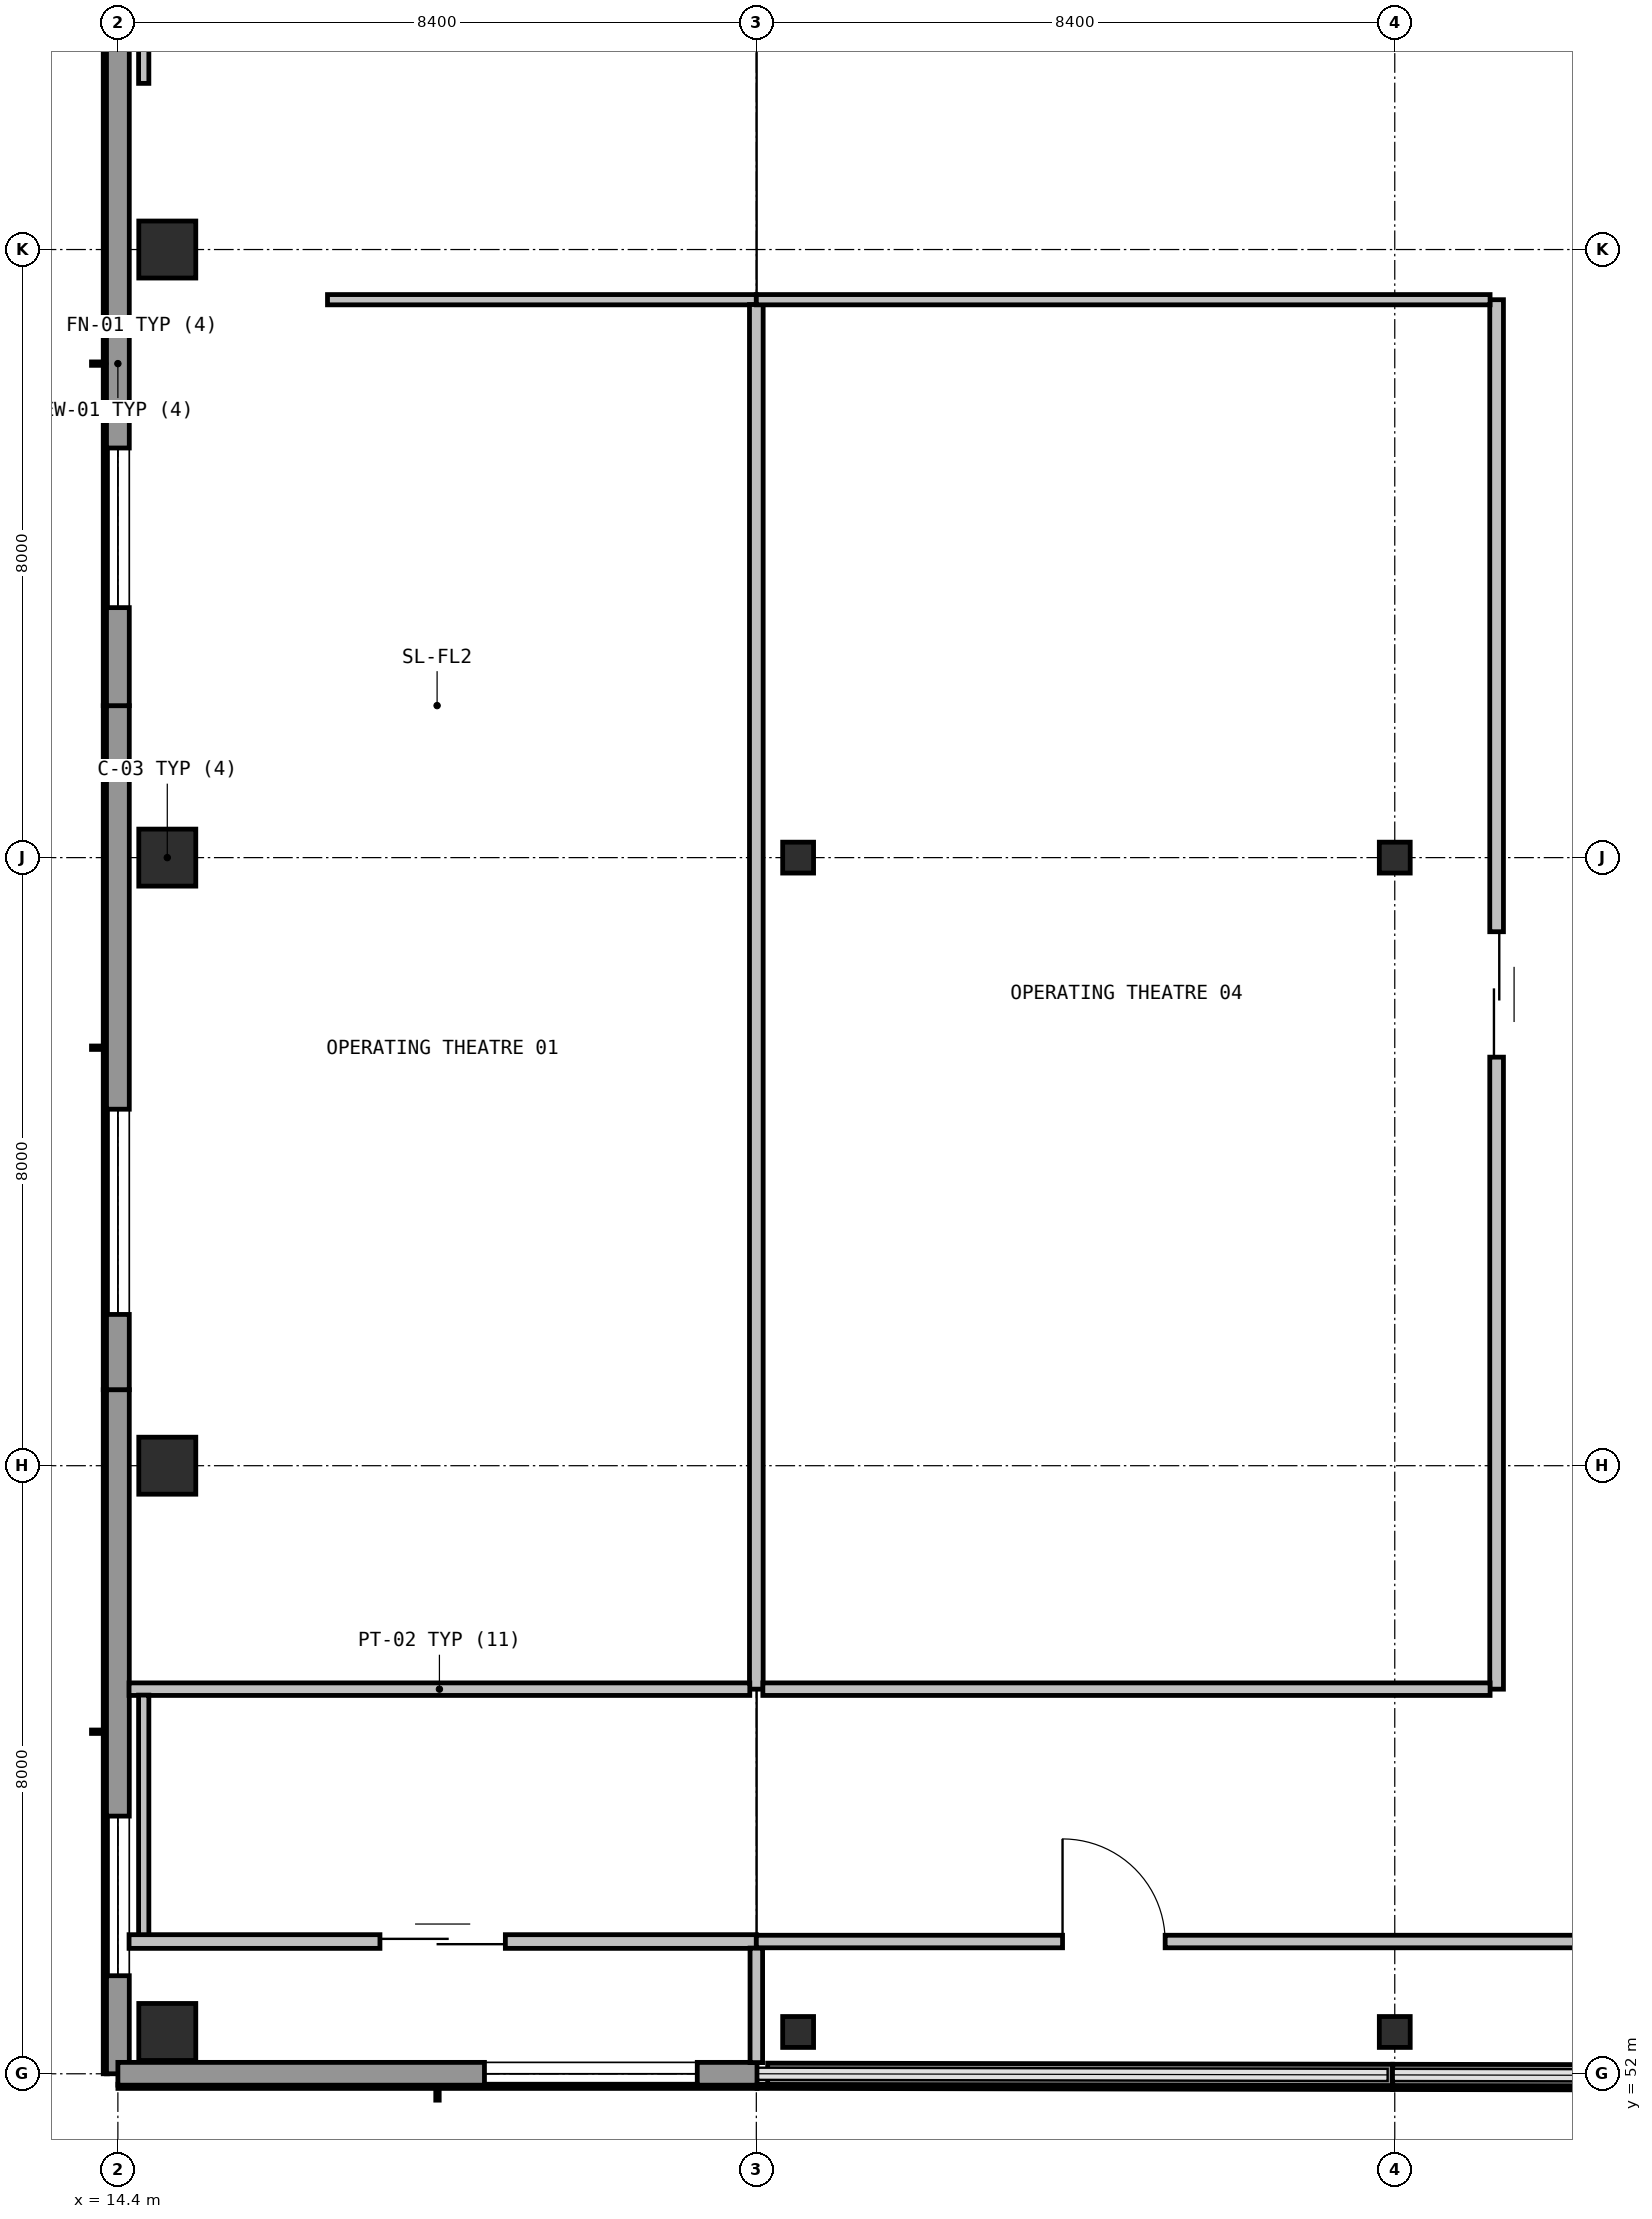
"""IFC4 building model, lengths in metres.
Left out: names, types, materials, properties, quantities, classifications, styles, units other than length and angle.
Written with IfcOpenShell. Run it as: python <this file> out.ifc"""

import sys

from ifc_helpers import new_model, si_unit, direction, frame, frame_2d, origin, origin_2d, place, context, subcontext, project, spatial, rectangle, hollow_circle, extrude, element, fill, save


model = new_model("IFC4")
c1 = context("Model", 3, precision=1e-05, world=origin(), true_north=direction((0.0, 1.0)))
c2 = subcontext(c1, "Body", "Model", "MODEL_VIEW")
j1 = project(units=[si_unit("LENGTHUNIT", "METRE"), si_unit("PLANEANGLEUNIT", "RADIAN")], contexts=[c1])
p1 = place(None, origin())
s1 = spatial("IfcSite", under=j1, at=p1, CompositionType="ELEMENT")
p2 = place(p1, origin())
s2 = spatial("IfcBuilding", under=s1, at=p2, CompositionType="ELEMENT")
p3 = place(p2, frame((0.0, 0.0, 10.2)))
s3 = spatial("IfcBuildingStorey", under=s2, at=p3, CompositionType="ELEMENT", Elevation=10.2)
p4 = place(p3, frame((23.35, 52.55, 0.0), z_axis=(0.0, 0.0, 1.0), x_axis=(1.0, 0.0, 0.0)))
e1 = element("IfcColumn", 1, at=p4, inside=s3, PredefinedType="COLUMN", context=c2, shape_type="SweptSolid", body=[
    extrude(hollow_circle(Radius=0.203, WallThickness=0.016, at=origin_2d()), origin(), (0.0, 0.0, 1.0), 4.555),
])
p5 = place(p3, frame((23.35, 68.0, 0.0), z_axis=(0.0, 0.0, 1.0), x_axis=(1.0, 0.0, 0.0)))
e2 = element("IfcColumn", 2, at=p5, inside=s3, PredefinedType="COLUMN", context=c2, shape_type="SweptSolid", body=[
    extrude(hollow_circle(Radius=0.203, WallThickness=0.016, at=origin_2d()), origin(), (0.0, 0.0, 1.0), 4.8),
])
p6 = place(p3, frame((31.2, 52.55, 0.0), z_axis=(0.0, 0.0, 1.0), x_axis=(1.0, 0.0, 0.0)))
e3 = element("IfcColumn", 3, at=p6, inside=s3, PredefinedType="COLUMN", context=c2, shape_type="SweptSolid", body=[
    extrude(hollow_circle(Radius=0.203, WallThickness=0.016, at=origin_2d()), origin(), (0.0, 0.0, 1.0), 4.555),
])
p7 = place(p3, frame((31.2, 68.0, 0.0), z_axis=(0.0, 0.0, 1.0), x_axis=(1.0, 0.0, 0.0)))
e4 = element("IfcColumn", 4, at=p7, inside=s3, PredefinedType="COLUMN", context=c2, shape_type="SweptSolid", body=[
    extrude(hollow_circle(Radius=0.203, WallThickness=0.016, at=origin_2d()), origin(), (0.0, 0.0, 1.0), 4.8),
])
for number, where, z_axis, x_axis in (
    (5, (15.05, 52.55, 0.0), (0.0, 0.0, 1.0), (1.0, 0.0, 0.0)),
    (6, (15.05, 60.0, 0.0), (0.0, 0.0, 1.0), (1.0, 0.0, 0.0)),
    (7, (15.05, 68.0, 0.0), (0.0, 0.0, 1.0), (1.0, 0.0, 0.0)),
    (8, (15.05, 76.0, 0.0), (0.0, 0.0, 1.0), (1.0, 0.0, 0.0)),
):
    element("IfcColumn", number, at=place(p3, frame(where, z_axis=z_axis, x_axis=x_axis)), inside=s3, PredefinedType="COLUMN", context=c2, shape_type="SweptSolid", body=[
        extrude(rectangle(XDim=0.75, YDim=0.75, at=origin_2d()), origin(), (0.0, 0.0, 1.0), 4.54),
    ])
p8 = place(p3, frame((14.4, 52.0, 0.0), z_axis=(0.0, 0.0, 1.0), x_axis=(0.0, 1.0, 0.0)))
e9 = element("IfcWall", 9, at=p8, inside=s3, PredefinedType="SOLIDWALL", context=c2, shape_type="SweptSolid", body=[
    extrude(rectangle(XDim=9.0, YDim=0.3, at=frame_2d((4.5, 0.0))), origin(), (0.0, 0.0, 1.0), 4.46),
])
p9 = place(p8, frame((1.29, 0.0, 0.96)))
e10 = element("IfcOpeningElement", 10, at=p9, cuts=e9, PredefinedType="OPENING", context=c2, shape_type="SweptSolid", body=[
    extrude(rectangle(XDim=2.1, YDim=1.5, at=frame_2d((1.05, 0.75))), frame((0.0, 0.16, 0.0), z_axis=(0.0, -1.0, 0.0), x_axis=(1.0, 0.0, 0.0)), (0.0, 0.0, 1.0), 0.32),
])
p10 = place(p3, frame((14.4, 61.0, 0.0), z_axis=(0.0, 0.0, 1.0), x_axis=(0.0, 1.0, 0.0)))
e11 = element("IfcWall", 11, at=p10, inside=s3, PredefinedType="SOLIDWALL", context=c2, shape_type="SweptSolid", body=[
    extrude(rectangle(XDim=8.999, YDim=0.3, at=frame_2d((4.5, 0.0))), origin(), (0.0, 0.0, 1.0), 4.46),
])
p11 = place(p10, frame((0.99, 0.0, 0.96)))
e12 = element("IfcOpeningElement", 12, at=p11, cuts=e11, PredefinedType="OPENING", context=c2, shape_type="SweptSolid", body=[
    extrude(rectangle(XDim=2.7, YDim=1.5, at=frame_2d((1.35, 0.75))), frame((0.0, 0.16, 0.0), z_axis=(0.0, -1.0, 0.0), x_axis=(1.0, 0.0, 0.0)), (0.0, 0.0, 1.0), 0.32),
])
p12 = place(p3, frame((14.4, 69.999, 0.0), z_axis=(0.0, 0.0, 1.0), x_axis=(0.0, 1.0, 0.0)))
e13 = element("IfcWall", 13, at=p12, inside=s3, PredefinedType="SOLIDWALL", context=c2, shape_type="SweptSolid", body=[
    extrude(rectangle(XDim=9.0, YDim=0.3, at=frame_2d((4.5, 0.0))), origin(), (0.0, 0.0, 1.0), 4.46),
])
p13 = place(p12, frame((1.29, 0.0, 0.96)))
e14 = element("IfcOpeningElement", 14, at=p13, cuts=e13, PredefinedType="OPENING", context=c2, shape_type="SweptSolid", body=[
    extrude(rectangle(XDim=2.1, YDim=1.65, at=frame_2d((1.05, 0.825))), frame((0.0, 0.16, 0.0), z_axis=(0.0, -1.0, 0.0), x_axis=(1.0, 0.0, 0.0)), (0.0, 0.0, 1.0), 0.32),
])
p14 = place(p3, frame((39.531, 51.97, 0.0), z_axis=(0.0, 0.0, 1.0), x_axis=(-0.999998360026, 0.001811062053, 0.0)))
e15 = element("IfcWall", 15, at=p14, inside=s3, PredefinedType="SOLIDWALL", context=c2, shape_type="SweptSolid", body=[
    extrude(rectangle(XDim=8.358, YDim=0.28, at=frame_2d((4.179, 0.0))), origin(), (0.0, 0.0, 1.0), 0.94),
])
p15 = place(p3, frame((31.169, 51.985, 0.0), z_axis=(0.0, 0.0, 1.0), x_axis=(-0.999998358775, 0.001811752647, 0.0)))
e16 = element("IfcWall", 16, at=p15, inside=s3, PredefinedType="SOLIDWALL", context=c2, shape_type="SweptSolid", body=[
    extrude(rectangle(XDim=8.22, YDim=0.28, at=frame_2d((4.11, 0.0))), origin(), (0.0, 0.0, 1.0), 0.94),
])
p16 = place(p3, frame((22.809, 52.0, 0.0), z_axis=(0.0, 0.0, 1.0), x_axis=(-1.0, 0.0, 0.0)))
e17 = element("IfcWall", 17, at=p16, inside=s3, PredefinedType="SOLIDWALL", context=c2, shape_type="SweptSolid", body=[
    extrude(rectangle(XDim=8.409, YDim=0.3, at=frame_2d((4.205, 0.0))), origin(), (0.0, 0.0, 1.0), 4.46),
])
p17 = place(p16, frame((0.786, 0.0, 0.96)))
e18 = element("IfcOpeningElement", 18, at=p17, cuts=e17, PredefinedType="OPENING", context=c2, shape_type="SweptSolid", body=[
    extrude(rectangle(XDim=2.8, YDim=1.65, at=frame_2d((1.4, 0.825))), frame((0.0, 0.16, 0.0), z_axis=(0.0, -1.0, 0.0), x_axis=(1.0, 0.0, 0.0)), (0.0, 0.0, 1.0), 0.32),
])
p18 = place(p3, frame((17.158, 75.34, 0.0), z_axis=(0.0, 0.0, 1.0), x_axis=(1.0, 0.0, 0.0)))
e19 = element("IfcWall", 19, at=p18, inside=s3, PredefinedType="PARTITIONING", context=c2, shape_type="SweptSolid", body=[
    extrude(rectangle(XDim=5.642, YDim=0.135, at=frame_2d((2.821, 0.0))), origin(), (0.0, 0.0, 1.0), 4.46),
])
p19 = place(p3, frame((22.8, 75.276, 0.0), z_axis=(0.0, 0.0, 1.0), x_axis=(0.0, -1.0, 0.0)))
e20 = element("IfcWall", 20, at=p19, inside=s3, PredefinedType="PARTITIONING", context=c2, shape_type="SweptSolid", body=[
    extrude(rectangle(XDim=18.216, YDim=0.18, at=frame_2d((9.108, 0.0))), origin(), (0.0, 0.0, 1.0), 4.46),
])
p20 = place(p3, frame((22.714, 57.06, 0.0), z_axis=(0.0, 0.0, 1.0), x_axis=(-1.0, 0.0, 0.0)))
e21 = element("IfcWall", 21, at=p20, inside=s3, PredefinedType="PARTITIONING", context=c2, shape_type="SweptSolid", body=[
    extrude(rectangle(XDim=8.167, YDim=0.165, at=frame_2d((4.083, 0.0))), origin(), (0.0, 0.0, 1.0), 4.46),
])
p21 = place(p3, frame((14.74, 56.982, 0.0), z_axis=(0.0, 0.0, 1.0), x_axis=(0.0, -1.0, 0.0)))
e22 = element("IfcWall", 22, at=p21, inside=s3, PredefinedType="PARTITIONING", context=c2, shape_type="SweptSolid", body=[
    extrude(rectangle(XDim=3.182, YDim=0.135, at=frame_2d((1.591, 0.0))), origin(), (0.0, 0.0, 1.0), 4.46),
])
p22 = place(p3, frame((14.547, 53.74, 0.0), z_axis=(0.0, 0.0, 1.0), x_axis=(1.0, 0.0, 0.0)))
e23 = element("IfcWall", 23, at=p22, inside=s3, PredefinedType="PARTITIONING", context=c2, shape_type="SweptSolid", body=[
    extrude(rectangle(XDim=8.253, YDim=0.18, at=frame_2d((4.126, 0.0))), origin(), (0.0, 0.0, 1.0), 4.46),
])
p23 = place(p22, frame((3.301, 0.0, 0.0)))
e24 = element("IfcOpeningElement", 24, at=p23, cuts=e23, PredefinedType="OPENING", context=c2, shape_type="SweptSolid", body=[
    extrude(rectangle(XDim=1.65, YDim=2.2, at=frame_2d((0.825, 1.1))), frame((0.0, 0.1, 0.0), z_axis=(0.0, -1.0, 0.0), x_axis=(1.0, 0.0, 0.0)), (0.0, 0.0, 1.0), 0.2),
])
p24 = place(p3, frame((22.8, 53.654, 0.0), z_axis=(0.0, 0.0, 1.0), x_axis=(0.0, -1.0, 0.0)))
e25 = element("IfcWall", 25, at=p24, inside=s3, PredefinedType="PARTITIONING", context=c2, shape_type="SweptSolid", body=[
    extrude(rectangle(XDim=1.507, YDim=0.165, at=frame_2d((0.753, 0.0))), origin(), (0.0, 0.0, 1.0), 4.46),
])
p25 = place(p3, frame((22.8, 53.74, 0.0), z_axis=(0.0, 0.0, 1.0), x_axis=(1.0, 0.0, 0.0)))
e26 = element("IfcWall", 26, at=p25, inside=s3, PredefinedType="PARTITIONING", context=c2, shape_type="SweptSolid", body=[
    extrude(rectangle(XDim=16.8, YDim=0.165, at=frame_2d((8.4, 0.0))), origin(), (0.0, 0.0, 1.0), 4.46),
])
p26 = place(p25, frame((4.029, 0.0, 0.0)))
e27 = element("IfcOpeningElement", 27, at=p26, cuts=e26, PredefinedType="OPENING", context=c2, shape_type="SweptSolid", body=[
    extrude(rectangle(XDim=1.35, YDim=2.15, at=frame_2d((0.675, 1.075))), frame((0.0, 0.093, 0.0), z_axis=(0.0, -1.0, 0.0), x_axis=(1.0, 0.0, 0.0)), (0.0, 0.0, 1.0), 0.185),
])
p27 = place(p3, frame((32.54, 75.34, 0.0), z_axis=(0.0, 0.0, 1.0), x_axis=(0.0, -1.0, 0.0)))
e28 = element("IfcWall", 28, at=p27, inside=s3, PredefinedType="PARTITIONING", context=c2, shape_type="SweptSolid", body=[
    extrude(rectangle(XDim=18.28, YDim=0.18, at=frame_2d((9.14, 0.0))), origin(), (0.0, 0.0, 1.0), 4.46),
])
p28 = place(p27, frame((8.315, 0.0, 0.0)))
e29 = element("IfcOpeningElement", 29, at=p28, cuts=e28, PredefinedType="OPENING", context=c2, shape_type="SweptSolid", body=[
    extrude(rectangle(XDim=1.65, YDim=2.2, at=frame_2d((0.825, 1.1))), frame((0.0, 0.1, 0.0), z_axis=(0.0, -1.0, 0.0), x_axis=(1.0, 0.0, 0.0)), (0.0, 0.0, 1.0), 0.2),
])
p29 = place(p3, frame((32.454, 57.06, 0.0), z_axis=(0.0, 0.0, 1.0), x_axis=(-1.0, 0.0, 0.0)))
e30 = element("IfcWall", 30, at=p29, inside=s3, PredefinedType="PARTITIONING", context=c2, shape_type="SweptSolid", body=[
    extrude(rectangle(XDim=9.568, YDim=0.165, at=frame_2d((4.784, 0.0))), origin(), (0.0, 0.0, 1.0), 4.46),
])
p30 = place(p3, frame((22.8, 75.34, 0.0), z_axis=(0.0, 0.0, 1.0), x_axis=(1.0, 0.0, 0.0)))
e31 = element("IfcWall", 31, at=p30, inside=s3, PredefinedType="PARTITIONING", context=c2, shape_type="SweptSolid", body=[
    extrude(rectangle(XDim=9.654, YDim=0.135, at=frame_2d((4.827, 0.0))), origin(), (0.0, 0.0, 1.0), 4.46),
])
p31 = place(p3, frame((14.74, 79.489, 0.0), z_axis=(0.0, 0.0, 1.0), x_axis=(0.0, -1.0, 0.0)))
e32 = element("IfcWall", 32, at=p31, inside=s3, PredefinedType="PARTITIONING", context=c2, shape_type="SweptSolid", body=[
    extrude(rectangle(XDim=1.303, YDim=0.135, at=frame_2d((0.651, 0.0))), origin(), (0.0, 0.0, 1.0), 4.46),
])
p32 = place(p9, origin())
e33 = element("IfcWindow", 33, at=p32, inside=s3, PartitioningType="SINGLE_PANEL", PredefinedType="WINDOW", context=c2, shape_type="SweptSolid", body=[
    extrude(rectangle(XDim=2.1, YDim=1.5, at=frame_2d((1.05, 0.75))), frame((0.0, 0.03, 0.0), z_axis=(0.0, -1.0, 0.0), x_axis=(1.0, 0.0, 0.0)), (0.0, 0.0, 1.0), 0.06),
])
fill(e10, e33)
p33 = place(p11, origin())
e34 = element("IfcWindow", 34, at=p33, inside=s3, PartitioningType="SINGLE_PANEL", PredefinedType="WINDOW", context=c2, shape_type="SweptSolid", body=[
    extrude(rectangle(XDim=2.7, YDim=1.5, at=frame_2d((1.35, 0.75))), frame((0.0, 0.03, 0.0), z_axis=(0.0, -1.0, 0.0), x_axis=(1.0, 0.0, 0.0)), (0.0, 0.0, 1.0), 0.06),
])
fill(e12, e34)
p34 = place(p13, origin())
e35 = element("IfcWindow", 35, at=p34, inside=s3, PartitioningType="SINGLE_PANEL", PredefinedType="WINDOW", context=c2, shape_type="SweptSolid", body=[
    extrude(rectangle(XDim=2.1, YDim=1.65, at=frame_2d((1.05, 0.825))), frame((0.0, 0.03, 0.0), z_axis=(0.0, -1.0, 0.0), x_axis=(1.0, 0.0, 0.0)), (0.0, 0.0, 1.0), 0.06),
])
fill(e14, e35)
p35 = place(p17, origin())
e36 = element("IfcWindow", 36, at=p35, inside=s3, PartitioningType="SINGLE_PANEL", PredefinedType="WINDOW", context=c2, shape_type="SweptSolid", body=[
    extrude(rectangle(XDim=2.8, YDim=1.65, at=frame_2d((1.4, 0.825))), frame((0.0, 0.03, 0.0), z_axis=(0.0, -1.0, 0.0), x_axis=(1.0, 0.0, 0.0)), (0.0, 0.0, 1.0), 0.06),
])
fill(e18, e36)
p36 = place(p23, origin())
e37 = element("IfcDoor", 37, at=p36, inside=s3, OperationType="DOUBLE_DOOR_SLIDING", PredefinedType="DOOR", context=c2, shape_type="SweptSolid", body=[
    extrude(rectangle(XDim=1.65, YDim=2.2, at=frame_2d((0.825, 1.1))), frame((0.0, 0.025, 0.0), z_axis=(0.0, -1.0, 0.0), x_axis=(1.0, 0.0, 0.0)), (0.0, 0.0, 1.0), 0.05),
])
fill(e24, e37)
p37 = place(p26, origin())
e38 = element("IfcDoor", 38, at=p37, inside=s3, OperationType="SINGLE_SWING_RIGHT", PredefinedType="DOOR", context=c2, shape_type="SweptSolid", body=[
    extrude(rectangle(XDim=1.35, YDim=2.15, at=frame_2d((0.675, 1.075))), frame((0.0, 0.025, 0.0), z_axis=(0.0, -1.0, 0.0), x_axis=(1.0, 0.0, 0.0)), (0.0, 0.0, 1.0), 0.05),
])
fill(e27, e38)
p38 = place(p28, origin())
e39 = element("IfcDoor", 39, at=p38, inside=s3, OperationType="DOUBLE_DOOR_SLIDING", PredefinedType="DOOR", context=c2, shape_type="SweptSolid", body=[
    extrude(rectangle(XDim=1.65, YDim=2.2, at=frame_2d((0.825, 1.1))), frame((0.0, 0.025, 0.0), z_axis=(0.0, -1.0, 0.0), x_axis=(1.0, 0.0, 0.0)), (0.0, 0.0, 1.0), 0.05),
])
fill(e29, e39)
save(model, sys.argv[1])
